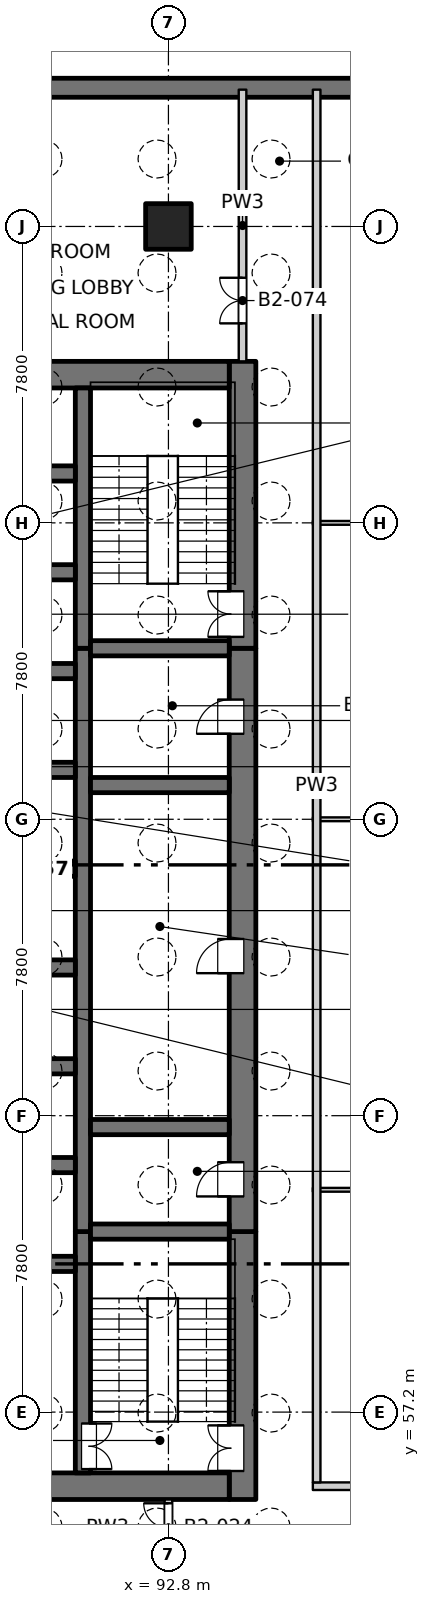
"""IFC4 building model, lengths in metres.
Left out: names, types, materials, properties, quantities, classifications, styles, units other than length and angle.
Written with IfcOpenShell. Run it as: python <this file> out.ifc"""

import sys

from ifc_helpers import new_model, si_unit, direction, frame, frame_2d, origin, origin_2d, place, context, subcontext, project, spatial, rectangle, extrude, element, fill, save


model = new_model("IFC4")
c1 = context("Model", 3, precision=1e-05, world=origin(), true_north=direction((0.0, 1.0)))
c2 = subcontext(c1, "Body", "Model", "MODEL_VIEW")
j1 = project(units=[si_unit("LENGTHUNIT", "METRE"), si_unit("PLANEANGLEUNIT", "RADIAN")], contexts=[c1])
p1 = place(None, origin())
s1 = spatial("IfcSite", under=j1, at=p1, CompositionType="ELEMENT")
p2 = place(p1, origin())
s2 = spatial("IfcBuilding", under=s1, at=p2, CompositionType="ELEMENT")
p3 = place(p2, frame((0.0, 0.0, -9.0)))
s3 = spatial("IfcBuildingStorey", under=s2, at=p3, CompositionType="ELEMENT", Elevation=-9.0)
p4 = place(p3, frame((42.6, 92.05, -0.5), z_axis=(0.0, 0.0, 1.0), x_axis=(1.0, 0.0, 0.0)))
e1 = element("IfcWall", 1, at=p4, inside=s3, PredefinedType="SOLIDWALL", context=c2, shape_type="SweptSolid", body=[
    extrude(rectangle(XDim=84.8, YDim=0.5, at=frame_2d((42.4, 0.0))), origin(), (0.0, 0.0, 1.0), 4.65),
])
p5 = place(p3, frame((92.8, 88.4, -0.5), z_axis=(0.0, 0.0, 1.0), x_axis=(1.0, 0.0, 0.0)))
e2 = element("IfcColumn", 2, at=p5, inside=s3, PredefinedType="COLUMN", context=c2, shape_type="SweptSolid", body=[
    extrude(rectangle(XDim=1.2, YDim=1.2, at=origin_2d()), origin(), (0.0, 0.0, 1.0), 4.65),
])
p6 = place(p3, frame((94.75, 54.9, -0.5), z_axis=(0.0, 0.0, 1.0), x_axis=(0.0, 1.0, 0.0)))
e3 = element("IfcWall", 3, at=p6, inside=s3, PredefinedType="SOLIDWALL", context=c2, shape_type="SweptSolid", body=[
    extrude(rectangle(XDim=7.05, YDim=0.7, at=frame_2d((3.525, 0.0))), origin(), (0.0, 0.0, 1.0), 4.65),
])
p7 = place(p6, frame((0.75, 0.0, 0.5)))
e4 = element("IfcOpeningElement", 4, at=p7, cuts=e3, PredefinedType="OPENING", context=c2, shape_type="SweptSolid", body=[
    extrude(rectangle(XDim=1.2, YDim=2.1, at=frame_2d((0.6, 1.05))), frame((0.0, 0.36, 0.0), z_axis=(0.0, -1.0, 0.0), x_axis=(1.0, 0.0, 0.0)), (0.0, 0.0, 1.0), 0.72),
])
p8 = place(p3, frame((94.75, 61.95, -0.5), z_axis=(0.0, 0.0, 1.0), x_axis=(0.0, 1.0, 0.0)))
e5 = element("IfcWall", 5, at=p8, inside=s3, PredefinedType="SOLIDWALL", context=c2, shape_type="SweptSolid", body=[
    extrude(rectangle(XDim=15.35, YDim=0.7, at=frame_2d((7.675, 0.0))), origin(), (0.0, 0.0, 1.0), 4.65),
])
p9 = place(p8, frame((0.925, 0.0, 0.5)))
e6 = element("IfcOpeningElement", 6, at=p9, cuts=e5, PredefinedType="OPENING", context=c2, shape_type="SweptSolid", body=[
    extrude(rectangle(XDim=0.9, YDim=2.1, at=frame_2d((0.45, 1.05))), frame((0.0, 0.36, 0.0), z_axis=(0.0, -1.0, 0.0), x_axis=(1.0, 0.0, 0.0)), (0.0, 0.0, 1.0), 0.72),
])
p10 = place(p8, frame((6.8, 0.0, 0.5)))
e7 = element("IfcOpeningElement", 7, at=p10, cuts=e5, PredefinedType="OPENING", context=c2, shape_type="SweptSolid", body=[
    extrude(rectangle(XDim=0.9, YDim=2.1, at=frame_2d((0.45, 1.05))), frame((0.0, 0.36, 0.0), z_axis=(0.0, -1.0, 0.0), x_axis=(1.0, 0.0, 0.0)), (0.0, 0.0, 1.0), 0.72),
])
p11 = place(p8, frame((13.1, 0.0, 0.5)))
e8 = element("IfcOpeningElement", 8, at=p11, cuts=e5, PredefinedType="OPENING", context=c2, shape_type="SweptSolid", body=[
    extrude(rectangle(XDim=0.9, YDim=2.1, at=frame_2d((0.45, 1.05))), frame((0.0, 0.36, 0.0), z_axis=(0.0, -1.0, 0.0), x_axis=(1.0, 0.0, 0.0)), (0.0, 0.0, 1.0), 0.72),
])
p12 = place(p3, frame((94.75, 77.3, -0.5), z_axis=(0.0, 0.0, 1.0), x_axis=(0.0, 1.0, 0.0)))
e9 = element("IfcWall", 9, at=p12, inside=s3, PredefinedType="SOLIDWALL", context=c2, shape_type="SweptSolid", body=[
    extrude(rectangle(XDim=7.55, YDim=0.7, at=frame_2d((3.775, 0.0))), origin(), (0.0, 0.0, 1.0), 4.65),
])
p13 = place(p12, frame((0.3, 0.0, 0.5)))
e10 = element("IfcOpeningElement", 10, at=p13, cuts=e9, PredefinedType="OPENING", context=c2, shape_type="SweptSolid", body=[
    extrude(rectangle(XDim=1.2, YDim=2.1, at=frame_2d((0.6, 1.05))), frame((0.0, 0.36, 0.0), z_axis=(0.0, -1.0, 0.0), x_axis=(1.0, 0.0, 0.0)), (0.0, 0.0, 1.0), 0.72),
])
p14 = place(p3, frame((75.6, 55.25, -0.5), z_axis=(0.0, 0.0, 1.0), x_axis=(1.0, 0.0, 0.0)))
e11 = element("IfcWall", 11, at=p14, inside=s3, PredefinedType="SOLIDWALL", context=c2, shape_type="SweptSolid", body=[
    extrude(rectangle(XDim=18.8, YDim=0.7, at=frame_2d((9.4, 0.0))), origin(), (0.0, 0.0, 1.0), 4.65),
])
p15 = place(p14, frame((8.65, 0.0, 0.5)))
e12 = element("IfcOpeningElement", 12, at=p15, cuts=e11, PredefinedType="OPENING", context=c2, shape_type="SweptSolid", body=[
    extrude(rectangle(XDim=1.5, YDim=2.1, at=frame_2d((0.75, 1.05))), frame((0.0, 0.36, 0.0), z_axis=(0.0, -1.0, 0.0), x_axis=(1.0, 0.0, 0.0)), (0.0, 0.0, 1.0), 0.72),
])
p16 = place(p3, frame((75.6, 84.5, -0.5), z_axis=(0.0, 0.0, 1.0), x_axis=(1.0, 0.0, 0.0)))
e13 = element("IfcWall", 13, at=p16, inside=s3, PredefinedType="SOLIDWALL", context=c2, shape_type="SweptSolid", body=[
    extrude(rectangle(XDim=18.8, YDim=0.7, at=frame_2d((9.4, 0.0))), origin(), (0.0, 0.0, 1.0), 4.65),
])
p17 = place(p3, frame((90.55, 55.6, -0.5), z_axis=(0.0, 0.0, 1.0), x_axis=(0.0, 1.0, 0.0)))
e14 = element("IfcWall", 14, at=p17, inside=s3, PredefinedType="SOLIDWALL", context=c2, shape_type="SweptSolid", body=[
    extrude(rectangle(XDim=6.35, YDim=0.4, at=frame_2d((3.175, 0.0))), origin(), (0.0, 0.0, 1.0), 4.65),
])
p18 = place(p17, frame((0.1, 0.0, 0.5)))
e15 = element("IfcOpeningElement", 15, at=p18, cuts=e14, PredefinedType="OPENING", context=c2, shape_type="SweptSolid", body=[
    extrude(rectangle(XDim=1.2, YDim=2.1, at=frame_2d((0.6, 1.05))), frame((0.0, 0.21, 0.0), z_axis=(0.0, -1.0, 0.0), x_axis=(1.0, 0.0, 0.0)), (0.0, 0.0, 1.0), 0.42),
])
p19 = place(p3, frame((90.55, 61.95, -0.5), z_axis=(0.0, 0.0, 1.0), x_axis=(0.0, 1.0, 0.0)))
e16 = element("IfcWall", 16, at=p19, inside=s3, PredefinedType="SOLIDWALL", context=c2, shape_type="SweptSolid", body=[
    extrude(rectangle(XDim=15.35, YDim=0.4, at=frame_2d((7.675, 0.0))), origin(), (0.0, 0.0, 1.0), 4.65),
])
p20 = place(p3, frame((90.55, 77.3, -0.5), z_axis=(0.0, 0.0, 1.0), x_axis=(0.0, 1.0, 0.0)))
e17 = element("IfcWall", 17, at=p20, inside=s3, PredefinedType="SOLIDWALL", context=c2, shape_type="SweptSolid", body=[
    extrude(rectangle(XDim=6.85, YDim=0.4, at=frame_2d((3.425, 0.0))), origin(), (0.0, 0.0, 1.0), 4.65),
])
for number, where, z_axis, x_axis in (
    (18, (87.35, 61.1, -0.5), (0.0, 0.0, 1.0), (1.0, 0.0, 0.0)),
    (19, (87.35, 63.7, -0.5), (0.0, 0.0, 1.0), (1.0, 0.0, 0.0)),
    (20, (87.35, 66.3, -0.5), (0.0, 0.0, 1.0), (1.0, 0.0, 0.0)),
    (21, (87.35, 68.9, -0.5), (0.0, 0.0, 1.0), (1.0, 0.0, 0.0)),
    (22, (87.35, 71.5, -0.5), (0.0, 0.0, 1.0), (1.0, 0.0, 0.0)),
    (23, (87.35, 74.1, -0.5), (0.0, 0.0, 1.0), (1.0, 0.0, 0.0)),
    (24, (87.35, 76.7, -0.5), (0.0, 0.0, 1.0), (1.0, 0.0, 0.0)),
    (25, (87.35, 79.3, -0.5), (0.0, 0.0, 1.0), (1.0, 0.0, 0.0)),
    (26, (87.35, 81.9, -0.5), (0.0, 0.0, 1.0), (1.0, 0.0, 0.0)),
):
    element("IfcWall", number, at=place(p3, frame(where, z_axis=z_axis, x_axis=x_axis)), inside=s3, PredefinedType="SOLIDWALL", context=c2, shape_type="SweptSolid", body=[
        extrude(rectangle(XDim=3.0, YDim=0.4, at=frame_2d((1.5, 0.0))), origin(), (0.0, 0.0, 1.0), 4.65),
    ])
for number, where, z_axis, x_axis in (
    (27, (90.75, 61.95, -0.5), (0.0, 0.0, 1.0), (1.0, 0.0, 0.0)),
    (28, (90.75, 64.7, -0.5), (0.0, 0.0, 1.0), (1.0, 0.0, 0.0)),
    (29, (90.75, 73.7, -0.5), (0.0, 0.0, 1.0), (1.0, 0.0, 0.0)),
    (30, (90.75, 77.3, -0.5), (0.0, 0.0, 1.0), (1.0, 0.0, 0.0)),
):
    element("IfcWall", number, at=place(p3, frame(where, z_axis=z_axis, x_axis=x_axis)), inside=s3, PredefinedType="SOLIDWALL", context=c2, shape_type="SweptSolid", body=[
        extrude(rectangle(XDim=3.65, YDim=0.4, at=frame_2d((1.825, 0.0))), origin(), (0.0, 0.0, 1.0), 4.65),
    ])
p21 = place(p3, frame((96.6, 55.25, 0.0), z_axis=(0.0, 0.0, 1.0), x_axis=(1.0, 0.0, 0.0)))
e31 = element("IfcWall", 31, at=p21, inside=s3, PredefinedType="PARTITIONING", context=c2, shape_type="SweptSolid", body=[
    extrude(rectangle(XDim=13.85, YDim=0.2, at=frame_2d((6.925, 0.0))), origin(), (0.0, 0.0, 1.0), 4.15),
])
for number, where, z_axis, x_axis in (
    (32, (96.6, 63.05, 0.0), (0.0, 0.0, 1.0), (1.0, 0.0, 0.0)),
    (33, (96.6, 72.8, 0.0), (0.0, 0.0, 1.0), (1.0, 0.0, 0.0)),
    (34, (96.6, 80.6, 0.0), (0.0, 0.0, 1.0), (1.0, 0.0, 0.0)),
):
    element("IfcWall", number, at=place(p3, frame(where, z_axis=z_axis, x_axis=x_axis)), inside=s3, PredefinedType="PARTITIONING", context=c2, shape_type="SweptSolid", body=[
        extrude(rectangle(XDim=13.85, YDim=0.1, at=frame_2d((6.925, 0.0))), origin(), (0.0, 0.0, 1.0), 4.15),
    ])
p22 = place(p3, frame((92.8, 53.4, 0.0), z_axis=(0.0, 0.0, 1.0), x_axis=(0.0, 1.0, 0.0)))
e35 = element("IfcWall", 35, at=p22, inside=s3, PredefinedType="PARTITIONING", context=c2, shape_type="SweptSolid", body=[
    extrude(rectangle(XDim=1.5, YDim=0.2, at=frame_2d((0.75, 0.0))), origin(), (0.0, 0.0, 1.0), 4.15),
])
p23 = place(p22, frame((0.1, 0.0, 0.0)))
e36 = element("IfcOpeningElement", 36, at=p23, cuts=e35, PredefinedType="OPENING", context=c2, shape_type="SweptSolid", body=[
    extrude(rectangle(XDim=1.3, YDim=2.1, at=frame_2d((0.65, 1.05))), frame((0.0, 0.11, 0.0), z_axis=(0.0, -1.0, 0.0), x_axis=(1.0, 0.0, 0.0)), (0.0, 0.0, 1.0), 0.22),
])
p24 = place(p3, frame((94.75, 84.85, 0.0), z_axis=(0.0, 0.0, 1.0), x_axis=(0.0, 1.0, 0.0)))
e37 = element("IfcWall", 37, at=p24, inside=s3, PredefinedType="PARTITIONING", context=c2, shape_type="SweptSolid", body=[
    extrude(rectangle(XDim=7.15, YDim=0.2, at=frame_2d((3.575, 0.0))), origin(), (0.0, 0.0, 1.0), 4.15),
])
p25 = place(p24, frame((1.0, 0.0, 0.0)))
e38 = element("IfcOpeningElement", 38, at=p25, cuts=e37, PredefinedType="OPENING", context=c2, shape_type="SweptSolid", body=[
    extrude(rectangle(XDim=1.2, YDim=2.1, at=frame_2d((0.6, 1.05))), frame((0.0, 0.11, 0.0), z_axis=(0.0, -1.0, 0.0), x_axis=(1.0, 0.0, 0.0)), (0.0, 0.0, 1.0), 0.22),
])
p26 = place(p3, frame((96.7, 55.35, 0.0), z_axis=(0.0, 0.0, 1.0), x_axis=(0.0, 1.0, 0.0)))
e39 = element("IfcWall", 39, at=p26, inside=s3, PredefinedType="PARTITIONING", context=c2, shape_type="SweptSolid", body=[
    extrude(rectangle(XDim=36.65, YDim=0.2, at=frame_2d((18.325, 0.0))), origin(), (0.0, 0.0, 1.0), 4.15),
])
p27 = place(p23, origin())
e40 = element("IfcDoor", 40, at=p27, inside=s3, OperationType="DOUBLE_DOOR_SINGLE_SWING", PredefinedType="DOOR", context=c2, shape_type="SweptSolid", body=[
    extrude(rectangle(XDim=1.3, YDim=2.1, at=frame_2d((0.65, 1.05))), frame((0.0, 0.025, 0.0), z_axis=(0.0, -1.0, 0.0), x_axis=(1.0, 0.0, 0.0)), (0.0, 0.0, 1.0), 0.05),
])
fill(e36, e40)
p28 = place(p18, origin())
e41 = element("IfcDoor", 41, at=p28, inside=s3, OperationType="DOUBLE_DOOR_SINGLE_SWING", PredefinedType="DOOR", context=c2, shape_type="SweptSolid", body=[
    extrude(rectangle(XDim=1.2, YDim=2.1, at=frame_2d((0.6, 1.05))), frame((0.0, -0.135, 0.0), z_axis=(0.0, -1.0, 0.0), x_axis=(1.0, 0.0, 0.0)), (0.0, 0.0, 1.0), 0.05),
])
fill(e15, e41)
p29 = place(p7, origin())
e42 = element("IfcDoor", 42, at=p29, inside=s3, OperationType="DOUBLE_DOOR_SINGLE_SWING", PredefinedType="DOOR", context=c2, shape_type="SweptSolid", body=[
    extrude(rectangle(XDim=1.2, YDim=2.1, at=frame_2d((0.6, 1.05))), frame((0.0, 0.335, 0.0), z_axis=(0.0, -1.0, 0.0), x_axis=(1.0, 0.0, 0.0)), (0.0, 0.0, 1.0), 0.05),
])
fill(e4, e42)
p30 = place(p9, origin())
e43 = element("IfcDoor", 43, at=p30, inside=s3, OperationType="SINGLE_SWING_LEFT", PredefinedType="DOOR", context=c2, shape_type="SweptSolid", body=[
    extrude(rectangle(XDim=0.9, YDim=2.1, at=frame_2d((0.45, 1.05))), frame((0.0, 0.335, 0.0), z_axis=(0.0, -1.0, 0.0), x_axis=(1.0, 0.0, 0.0)), (0.0, 0.0, 1.0), 0.05),
])
fill(e6, e43)
p31 = place(p10, origin())
e44 = element("IfcDoor", 44, at=p31, inside=s3, OperationType="SINGLE_SWING_LEFT", PredefinedType="DOOR", context=c2, shape_type="SweptSolid", body=[
    extrude(rectangle(XDim=0.9, YDim=2.1, at=frame_2d((0.45, 1.05))), frame((0.0, 0.335, 0.0), z_axis=(0.0, -1.0, 0.0), x_axis=(1.0, 0.0, 0.0)), (0.0, 0.0, 1.0), 0.05),
])
fill(e7, e44)
p32 = place(p11, origin())
e45 = element("IfcDoor", 45, at=p32, inside=s3, OperationType="SINGLE_SWING_LEFT", PredefinedType="DOOR", context=c2, shape_type="SweptSolid", body=[
    extrude(rectangle(XDim=0.9, YDim=2.1, at=frame_2d((0.45, 1.05))), frame((0.0, 0.335, 0.0), z_axis=(0.0, -1.0, 0.0), x_axis=(1.0, 0.0, 0.0)), (0.0, 0.0, 1.0), 0.05),
])
fill(e8, e45)
p33 = place(p13, origin())
e46 = element("IfcDoor", 46, at=p33, inside=s3, OperationType="DOUBLE_DOOR_SINGLE_SWING", PredefinedType="DOOR", context=c2, shape_type="SweptSolid", body=[
    extrude(rectangle(XDim=1.2, YDim=2.1, at=frame_2d((0.6, 1.05))), frame((0.0, 0.335, 0.0), z_axis=(0.0, -1.0, 0.0), x_axis=(1.0, 0.0, 0.0)), (0.0, 0.0, 1.0), 0.05),
])
fill(e10, e46)
p34 = place(p25, origin())
e47 = element("IfcDoor", 47, at=p34, inside=s3, OperationType="DOUBLE_DOOR_SINGLE_SWING", PredefinedType="DOOR", context=c2, shape_type="SweptSolid", body=[
    extrude(rectangle(XDim=1.2, YDim=2.1, at=frame_2d((0.6, 1.05))), frame((0.0, 0.025, 0.0), z_axis=(0.0, -1.0, 0.0), x_axis=(1.0, 0.0, 0.0)), (0.0, 0.0, 1.0), 0.05),
])
fill(e38, e47)
save(model, sys.argv[1])
